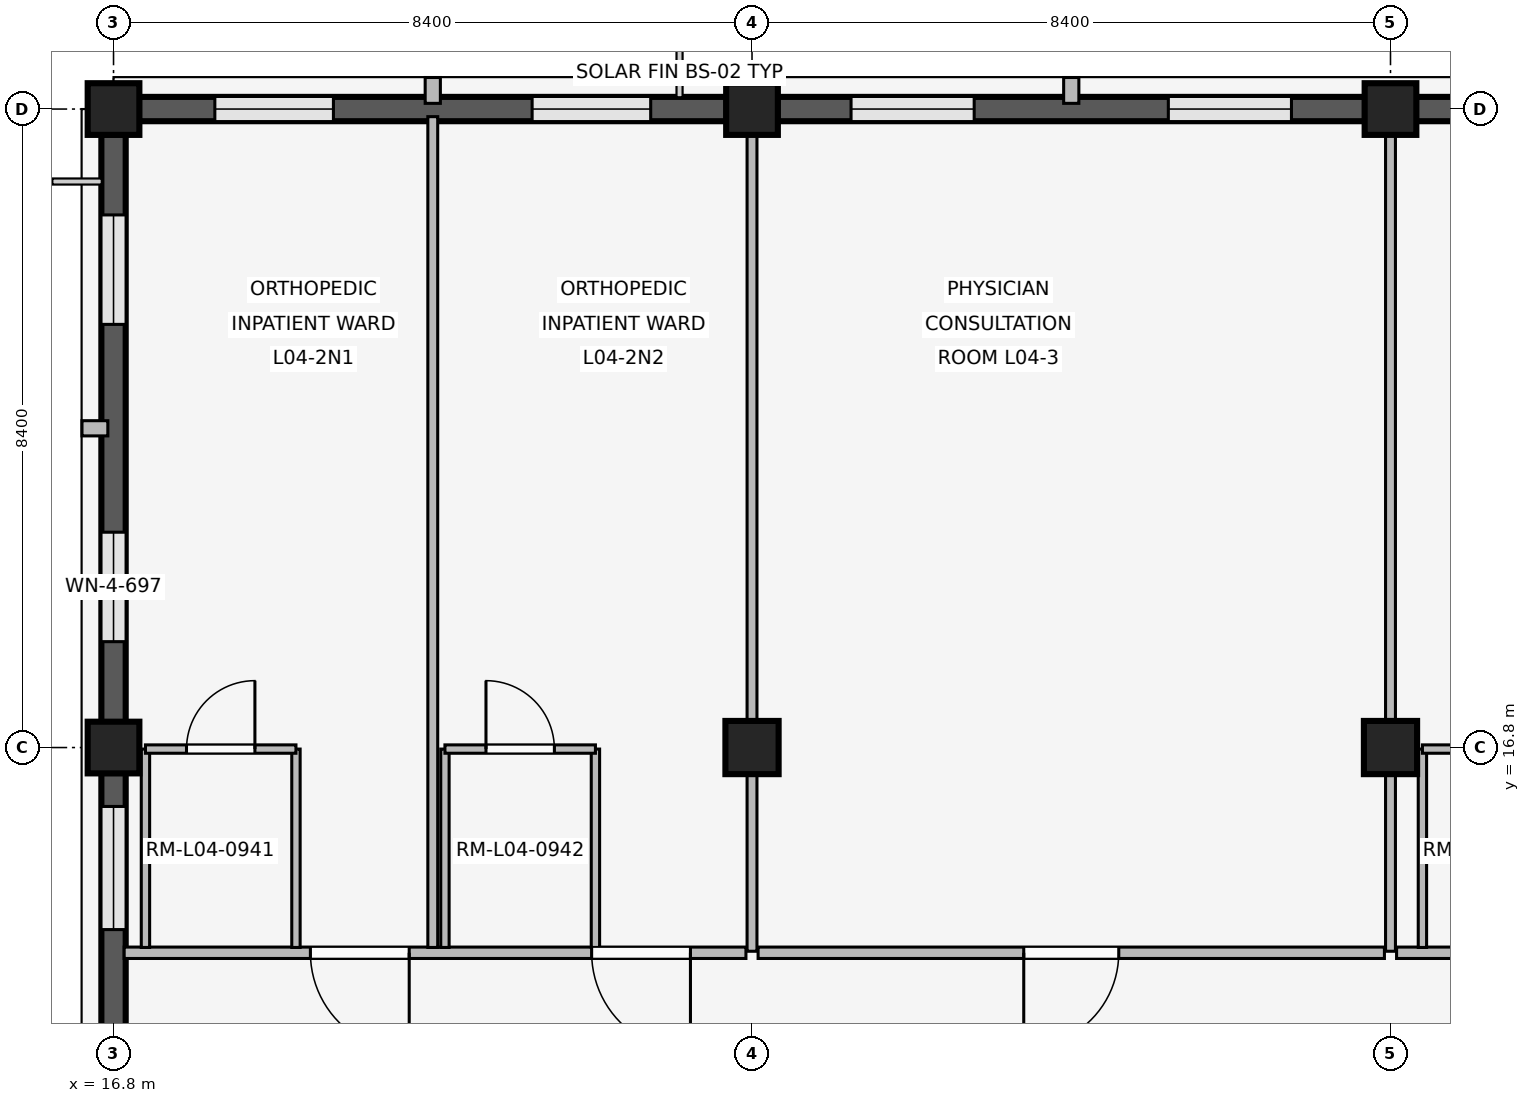
"""IFC4 building model, lengths in metres.
Left out: names, types, materials, properties, quantities, classifications, styles, units other than length and angle.
Written with IfcOpenShell. Run it as: python <this file> out.ifc"""

import sys

from ifc_helpers import new_model, si_unit, direction, frame, frame_2d, origin, origin_2d, place, context, subcontext, project, spatial, rectangle, extrude, element, fill, save


model = new_model("IFC4")
c1 = context("Model", 3, precision=1e-05, world=origin(), true_north=direction((0.0, 1.0)))
c2 = subcontext(c1, "Body", "Model", "MODEL_VIEW")
j1 = project(units=[si_unit("LENGTHUNIT", "METRE"), si_unit("PLANEANGLEUNIT", "RADIAN")], contexts=[c1])
p1 = place(None, origin())
s1 = spatial("IfcSite", under=j1, at=p1, CompositionType="ELEMENT")
p2 = place(p1, origin())
s2 = spatial("IfcBuilding", under=s1, at=p2, CompositionType="ELEMENT")
p3 = place(p2, frame((0.0, 0.0, 16.2)))
s3 = spatial("IfcBuildingStorey", under=s2, at=p3, CompositionType="ELEMENT", Elevation=16.2)
for number, where, z_axis, x_axis in (
    (1, (16.8, 16.8, 0.0), (0.0, 0.0, 1.0), (1.0, 0.0, 0.0)),
    (2, (16.8, 25.2, 0.0), (0.0, 0.0, 1.0), (1.0, 0.0, 0.0)),
):
    element("IfcColumn", number, at=place(p3, frame(where, z_axis=z_axis, x_axis=x_axis)), inside=s3, PredefinedType="COLUMN", context=c2, shape_type="SweptSolid", body=[
        extrude(rectangle(XDim=0.68, YDim=0.68, at=origin_2d()), origin(), (0.0, 0.0, 1.0), 4.2),
    ])
p4 = place(p3, frame((25.2, 16.8, 0.0), z_axis=(0.0, 0.0, 1.0), x_axis=(1.0, 0.0, 0.0)))
e3 = element("IfcColumn", 3, at=p4, inside=s3, PredefinedType="COLUMN", context=c2, shape_type="SweptSolid", body=[
    extrude(rectangle(XDim=0.7, YDim=0.7, at=origin_2d()), origin(), (0.0, 0.0, 1.0), 4.2),
])
p5 = place(p3, frame((25.2, 25.2, 0.0), z_axis=(0.0, 0.0, 1.0), x_axis=(1.0, 0.0, 0.0)))
e4 = element("IfcColumn", 4, at=p5, inside=s3, PredefinedType="COLUMN", context=c2, shape_type="SweptSolid", body=[
    extrude(rectangle(XDim=0.68, YDim=0.68, at=origin_2d()), origin(), (0.0, 0.0, 1.0), 4.2),
])
p6 = place(p3, frame((33.6, 16.8, 0.0), z_axis=(0.0, 0.0, 1.0), x_axis=(1.0, 0.0, 0.0)))
e5 = element("IfcColumn", 5, at=p6, inside=s3, PredefinedType="COLUMN", context=c2, shape_type="SweptSolid", body=[
    extrude(rectangle(XDim=0.7, YDim=0.7, at=origin_2d()), origin(), (0.0, 0.0, 1.0), 4.2),
])
p7 = place(p3, frame((33.6, 25.2, 0.0), z_axis=(0.0, 0.0, 1.0), x_axis=(1.0, 0.0, 0.0)))
e6 = element("IfcColumn", 6, at=p7, inside=s3, PredefinedType="COLUMN", context=c2, shape_type="SweptSolid", body=[
    extrude(rectangle(XDim=0.68, YDim=0.68, at=origin_2d()), origin(), (0.0, 0.0, 1.0), 4.2),
])
p8 = place(p3, frame((16.8, 8.735, 0.0), z_axis=(0.0, 0.0, 1.0), x_axis=(0.0, 1.0, 0.0)))
e7 = element("IfcWall", 7, at=p8, inside=s3, PredefinedType="SOLIDWALL", context=c2, shape_type="SweptSolid", body=[
    extrude(rectangle(XDim=7.73, YDim=0.32, at=frame_2d((3.865, 0.0))), origin(), (0.0, 0.0, 1.0), 3.32),
])
p9 = place(p8, frame((0.49, 0.0, 0.85)))
e8 = element("IfcOpeningElement", 8, at=p9, cuts=e7, PredefinedType="OPENING", context=c2, shape_type="SweptSolid", body=[
    extrude(rectangle(XDim=1.62, YDim=1.8, at=frame_2d((0.81, 0.9))), frame((0.0, 0.17, 0.0), z_axis=(0.0, -1.0, 0.0), x_axis=(1.0, 0.0, 0.0)), (0.0, 0.0, 1.0), 0.34),
])
p10 = place(p8, frame((5.67, 0.0, 0.85)))
e9 = element("IfcOpeningElement", 9, at=p10, cuts=e7, PredefinedType="OPENING", context=c2, shape_type="SweptSolid", body=[
    extrude(rectangle(XDim=1.62, YDim=1.8, at=frame_2d((0.81, 0.9))), frame((0.0, 0.17, 0.0), z_axis=(0.0, -1.0, 0.0), x_axis=(1.0, 0.0, 0.0)), (0.0, 0.0, 1.0), 0.34),
])
p11 = place(p3, frame((17.135, 25.2, 0.0), z_axis=(0.0, 0.0, 1.0), x_axis=(1.0, 0.0, 0.0)))
e10 = element("IfcWall", 10, at=p11, inside=s3, PredefinedType="SOLIDWALL", context=c2, shape_type="SweptSolid", body=[
    extrude(rectangle(XDim=7.73, YDim=0.32, at=frame_2d((3.865, 0.0))), origin(), (0.0, 0.0, 1.0), 3.32),
])
p12 = place(p11, frame((0.998, 0.0, 0.85)))
e11 = element("IfcOpeningElement", 11, at=p12, cuts=e10, PredefinedType="OPENING", context=c2, shape_type="SweptSolid", body=[
    extrude(rectangle(XDim=1.56, YDim=1.7, at=frame_2d((0.78, 0.85))), frame((0.0, 0.17, 0.0), z_axis=(0.0, -1.0, 0.0), x_axis=(1.0, 0.0, 0.0)), (0.0, 0.0, 1.0), 0.34),
])
p13 = place(p11, frame((5.172, 0.0, 0.85)))
e12 = element("IfcOpeningElement", 12, at=p13, cuts=e10, PredefinedType="OPENING", context=c2, shape_type="SweptSolid", body=[
    extrude(rectangle(XDim=1.56, YDim=1.7, at=frame_2d((0.78, 0.85))), frame((0.0, 0.17, 0.0), z_axis=(0.0, -1.0, 0.0), x_axis=(1.0, 0.0, 0.0)), (0.0, 0.0, 1.0), 0.34),
])
p14 = place(p3, frame((21.0, 25.275, 0.0), z_axis=(0.0, 0.0, 1.0), x_axis=(0.0, 1.0, 0.0)))
e13 = element("IfcWall", 13, at=p14, inside=s3, PredefinedType="ELEMENTEDWALL", context=c2, shape_type="SweptSolid", body=[
    extrude(rectangle(XDim=0.34, YDim=0.2, at=frame_2d((0.17, 0.0))), origin(), (0.0, 0.0, 1.0), 3.3),
])
p15 = place(p3, frame((16.8, 17.135, 0.0), z_axis=(0.0, 0.0, 1.0), x_axis=(0.0, 1.0, 0.0)))
e14 = element("IfcWall", 14, at=p15, inside=s3, PredefinedType="SOLIDWALL", context=c2, shape_type="SweptSolid", body=[
    extrude(rectangle(XDim=7.73, YDim=0.32, at=frame_2d((3.865, 0.0))), origin(), (0.0, 0.0, 1.0), 3.32),
])
p16 = place(p15, frame((1.058, 0.0, 0.85)))
e15 = element("IfcOpeningElement", 15, at=p16, cuts=e14, PredefinedType="OPENING", context=c2, shape_type="SweptSolid", body=[
    extrude(rectangle(XDim=1.44, YDim=1.62, at=frame_2d((0.72, 0.81))), frame((0.0, 0.17, 0.0), z_axis=(0.0, -1.0, 0.0), x_axis=(1.0, 0.0, 0.0)), (0.0, 0.0, 1.0), 0.34),
])
p17 = place(p15, frame((5.232, 0.0, 0.85)))
e16 = element("IfcOpeningElement", 16, at=p17, cuts=e14, PredefinedType="OPENING", context=c2, shape_type="SweptSolid", body=[
    extrude(rectangle(XDim=1.44, YDim=1.62, at=frame_2d((0.72, 0.81))), frame((0.0, 0.17, 0.0), z_axis=(0.0, -1.0, 0.0), x_axis=(1.0, 0.0, 0.0)), (0.0, 0.0, 1.0), 0.34),
])
p18 = place(p3, frame((16.725, 21.0, 0.0), z_axis=(0.0, 0.0, 1.0), x_axis=(-1.0, 0.0, 0.0)))
e17 = element("IfcWall", 17, at=p18, inside=s3, PredefinedType="ELEMENTEDWALL", context=c2, shape_type="SweptSolid", body=[
    extrude(rectangle(XDim=0.34, YDim=0.2, at=frame_2d((0.17, 0.0))), origin(), (0.0, 0.0, 1.0), 3.3),
])
p19 = place(p3, frame((25.535, 25.2, 0.0), z_axis=(0.0, 0.0, 1.0), x_axis=(1.0, 0.0, 0.0)))
e18 = element("IfcWall", 18, at=p19, inside=s3, PredefinedType="SOLIDWALL", context=c2, shape_type="SweptSolid", body=[
    extrude(rectangle(XDim=7.73, YDim=0.32, at=frame_2d((3.865, 0.0))), origin(), (0.0, 0.0, 1.0), 3.32),
])
p20 = place(p19, frame((0.968, 0.0, 0.85)))
e19 = element("IfcOpeningElement", 19, at=p20, cuts=e18, PredefinedType="OPENING", context=c2, shape_type="SweptSolid", body=[
    extrude(rectangle(XDim=1.62, YDim=1.8, at=frame_2d((0.81, 0.9))), frame((0.0, 0.17, 0.0), z_axis=(0.0, -1.0, 0.0), x_axis=(1.0, 0.0, 0.0)), (0.0, 0.0, 1.0), 0.34),
])
p21 = place(p19, frame((5.142, 0.0, 0.85)))
e20 = element("IfcOpeningElement", 20, at=p21, cuts=e18, PredefinedType="OPENING", context=c2, shape_type="SweptSolid", body=[
    extrude(rectangle(XDim=1.62, YDim=1.8, at=frame_2d((0.81, 0.9))), frame((0.0, 0.17, 0.0), z_axis=(0.0, -1.0, 0.0), x_axis=(1.0, 0.0, 0.0)), (0.0, 0.0, 1.0), 0.34),
])
p22 = place(p3, frame((29.4, 25.275, 0.0), z_axis=(0.0, 0.0, 1.0), x_axis=(0.0, 1.0, 0.0)))
e21 = element("IfcWall", 21, at=p22, inside=s3, PredefinedType="ELEMENTEDWALL", context=c2, shape_type="SweptSolid", body=[
    extrude(rectangle(XDim=0.34, YDim=0.2, at=frame_2d((0.17, 0.0))), origin(), (0.0, 0.0, 1.0), 3.3),
])
p23 = place(p3, frame((33.935, 25.2, 0.0), z_axis=(0.0, 0.0, 1.0), x_axis=(1.0, 0.0, 0.0)))
e22 = element("IfcWall", 22, at=p23, inside=s3, PredefinedType="SOLIDWALL", context=c2, shape_type="SweptSolid", body=[
    extrude(rectangle(XDim=7.73, YDim=0.32, at=frame_2d((3.865, 0.0))), origin(), (0.0, 0.0, 1.0), 3.32),
])
p24 = place(p23, frame((1.058, 0.0, 0.85)))
e23 = element("IfcOpeningElement", 23, at=p24, cuts=e22, PredefinedType="OPENING", context=c2, shape_type="SweptSolid", body=[
    extrude(rectangle(XDim=1.44, YDim=1.62, at=frame_2d((0.72, 0.81))), frame((0.0, 0.17, 0.0), z_axis=(0.0, -1.0, 0.0), x_axis=(1.0, 0.0, 0.0)), (0.0, 0.0, 1.0), 0.34),
])
p25 = place(p23, frame((5.232, 0.0, 0.85)))
e24 = element("IfcOpeningElement", 24, at=p25, cuts=e22, PredefinedType="OPENING", context=c2, shape_type="SweptSolid", body=[
    extrude(rectangle(XDim=1.44, YDim=1.62, at=frame_2d((0.72, 0.81))), frame((0.0, 0.17, 0.0), z_axis=(0.0, -1.0, 0.0), x_axis=(1.0, 0.0, 0.0)), (0.0, 0.0, 1.0), 0.34),
])
p26 = place(p3, frame((25.12, 14.1, 0.0), z_axis=(0.0, 0.0, 1.0), x_axis=(-1.0, 0.0, 0.0)))
e25 = element("IfcWall", 25, at=p26, inside=s3, PredefinedType="PARTITIONING", context=c2, shape_type="SweptSolid", body=[
    extrude(rectangle(XDim=8.18, YDim=0.15, at=frame_2d((4.09, 0.0))), origin(), (0.0, 0.0, 1.0), 3.3),
])
p27 = place(p26, frame((0.73, 0.0, 0.0)))
e26 = element("IfcOpeningElement", 26, at=p27, cuts=e25, PredefinedType="OPENING", context=c2, shape_type="SweptSolid", body=[
    extrude(rectangle(XDim=1.3, YDim=2.25, at=frame_2d((0.65, 1.125))), frame((0.0, 0.085, 0.0), z_axis=(0.0, -1.0, 0.0), x_axis=(1.0, 0.0, 0.0)), (0.0, 0.0, 1.0), 0.17),
])
p28 = place(p26, frame((4.43, 0.0, 0.0)))
e27 = element("IfcOpeningElement", 27, at=p28, cuts=e25, PredefinedType="OPENING", context=c2, shape_type="SweptSolid", body=[
    extrude(rectangle(XDim=1.3, YDim=2.25, at=frame_2d((0.65, 1.125))), frame((0.0, 0.085, 0.0), z_axis=(0.0, -1.0, 0.0), x_axis=(1.0, 0.0, 0.0)), (0.0, 0.0, 1.0), 0.17),
])
p29 = place(p3, frame((21.0, 14.17, 0.0), z_axis=(0.0, 0.0, 1.0), x_axis=(0.0, 1.0, 0.0)))
e28 = element("IfcWall", 28, at=p29, inside=s3, PredefinedType="PARTITIONING", context=c2, shape_type="SweptSolid", body=[
    extrude(rectangle(XDim=10.93, YDim=0.13, at=frame_2d((5.465, 0.0))), origin(), (0.0, 0.0, 1.0), 3.3),
])
for number, where, z_axis, x_axis in (
    (29, (17.22, 14.17, 0.0), (0.0, 0.0, 1.0), (0.0, 1.0, 0.0)),
    (30, (19.2, 14.17, 0.0), (0.0, 0.0, 1.0), (0.0, 1.0, 0.0)),
):
    element("IfcWall", number, at=place(p3, frame(where, z_axis=z_axis, x_axis=x_axis)), inside=s3, PredefinedType="PARTITIONING", context=c2, shape_type="SweptSolid", body=[
        extrude(rectangle(XDim=2.61, YDim=0.11, at=frame_2d((1.305, 0.0))), origin(), (0.0, 0.0, 1.0), 3.3),
    ])
p30 = place(p3, frame((17.22, 16.78, 0.0), z_axis=(0.0, 0.0, 1.0), x_axis=(1.0, 0.0, 0.0)))
e31 = element("IfcWall", 31, at=p30, inside=s3, PredefinedType="PARTITIONING", context=c2, shape_type="SweptSolid", body=[
    extrude(rectangle(XDim=1.98, YDim=0.11, at=frame_2d((0.99, 0.0))), origin(), (0.0, 0.0, 1.0), 3.3),
])
p31 = place(p30, frame((0.54, 0.0, 0.0)))
e32 = element("IfcOpeningElement", 32, at=p31, cuts=e31, PredefinedType="OPENING", context=c2, shape_type="SweptSolid", body=[
    extrude(rectangle(XDim=0.9, YDim=2.1, at=frame_2d((0.45, 1.05))), frame((0.0, 0.065, 0.0), z_axis=(0.0, -1.0, 0.0), x_axis=(1.0, 0.0, 0.0)), (0.0, 0.0, 1.0), 0.13),
])
for number, where, z_axis, x_axis in (
    (33, (21.16, 14.17, 0.0), (0.0, 0.0, 1.0), (0.0, 1.0, 0.0)),
    (34, (23.14, 14.17, 0.0), (0.0, 0.0, 1.0), (0.0, 1.0, 0.0)),
):
    element("IfcWall", number, at=place(p3, frame(where, z_axis=z_axis, x_axis=x_axis)), inside=s3, PredefinedType="PARTITIONING", context=c2, shape_type="SweptSolid", body=[
        extrude(rectangle(XDim=2.61, YDim=0.11, at=frame_2d((1.305, 0.0))), origin(), (0.0, 0.0, 1.0), 3.3),
    ])
p32 = place(p3, frame((21.16, 16.78, 0.0), z_axis=(0.0, 0.0, 1.0), x_axis=(1.0, 0.0, 0.0)))
e35 = element("IfcWall", 35, at=p32, inside=s3, PredefinedType="PARTITIONING", context=c2, shape_type="SweptSolid", body=[
    extrude(rectangle(XDim=1.98, YDim=0.11, at=frame_2d((0.99, 0.0))), origin(), (0.0, 0.0, 1.0), 3.3),
])
p33 = place(p32, frame((0.54, 0.0, 0.0)))
e36 = element("IfcOpeningElement", 36, at=p33, cuts=e35, PredefinedType="OPENING", context=c2, shape_type="SweptSolid", body=[
    extrude(rectangle(XDim=0.9, YDim=2.1, at=frame_2d((0.45, 1.05))), frame((0.0, 0.065, 0.0), z_axis=(0.0, -1.0, 0.0), x_axis=(1.0, 0.0, 0.0)), (0.0, 0.0, 1.0), 0.13),
])
p34 = place(p3, frame((25.2, 14.12, 0.0), z_axis=(0.0, 0.0, 1.0), x_axis=(0.0, 1.0, 0.0)))
e37 = element("IfcWall", 37, at=p34, inside=s3, PredefinedType="PARTITIONING", context=c2, shape_type="SweptSolid", body=[
    extrude(rectangle(XDim=10.94, YDim=0.13, at=frame_2d((5.47, 0.0))), origin(), (0.0, 0.0, 1.0), 3.3),
])
p35 = place(p3, frame((33.52, 14.1, 0.0), z_axis=(0.0, 0.0, 1.0), x_axis=(-1.0, 0.0, 0.0)))
e38 = element("IfcWall", 38, at=p35, inside=s3, PredefinedType="PARTITIONING", context=c2, shape_type="SweptSolid", body=[
    extrude(rectangle(XDim=8.24, YDim=0.15, at=frame_2d((4.12, 0.0))), origin(), (0.0, 0.0, 1.0), 3.3),
])
p36 = place(p35, frame((3.495, 0.0, 0.0)))
e39 = element("IfcOpeningElement", 39, at=p36, cuts=e38, PredefinedType="OPENING", context=c2, shape_type="SweptSolid", body=[
    extrude(rectangle(XDim=1.25, YDim=2.2, at=frame_2d((0.625, 1.1))), frame((0.0, 0.085, 0.0), z_axis=(0.0, -1.0, 0.0), x_axis=(1.0, 0.0, 0.0)), (0.0, 0.0, 1.0), 0.17),
])
p37 = place(p3, frame((33.6, 14.12, 0.0), z_axis=(0.0, 0.0, 1.0), x_axis=(0.0, 1.0, 0.0)))
e40 = element("IfcWall", 40, at=p37, inside=s3, PredefinedType="PARTITIONING", context=c2, shape_type="SweptSolid", body=[
    extrude(rectangle(XDim=10.94, YDim=0.13, at=frame_2d((5.47, 0.0))), origin(), (0.0, 0.0, 1.0), 3.3),
])
p38 = place(p3, frame((41.64, 14.1, 0.0), z_axis=(0.0, 0.0, 1.0), x_axis=(-1.0, 0.0, 0.0)))
e41 = element("IfcWall", 41, at=p38, inside=s3, PredefinedType="PARTITIONING", context=c2, shape_type="SweptSolid", body=[
    extrude(rectangle(XDim=7.96, YDim=0.15, at=frame_2d((3.98, 0.0))), origin(), (0.0, 0.0, 1.0), 3.3),
])
p39 = place(p38, frame((0.45, 0.0, 0.0)))
e42 = element("IfcOpeningElement", 42, at=p39, cuts=e41, PredefinedType="OPENING", context=c2, shape_type="SweptSolid", body=[
    extrude(rectangle(XDim=1.3, YDim=2.25, at=frame_2d((0.65, 1.125))), frame((0.0, 0.085, 0.0), z_axis=(0.0, -1.0, 0.0), x_axis=(1.0, 0.0, 0.0)), (0.0, 0.0, 1.0), 0.17),
])
p40 = place(p38, frame((4.15, 0.0, 0.0)))
e43 = element("IfcOpeningElement", 43, at=p40, cuts=e41, PredefinedType="OPENING", context=c2, shape_type="SweptSolid", body=[
    extrude(rectangle(XDim=1.3, YDim=2.25, at=frame_2d((0.65, 1.125))), frame((0.0, 0.085, 0.0), z_axis=(0.0, -1.0, 0.0), x_axis=(1.0, 0.0, 0.0)), (0.0, 0.0, 1.0), 0.17),
])
p41 = place(p3, frame((34.02, 14.17, 0.0), z_axis=(0.0, 0.0, 1.0), x_axis=(0.0, 1.0, 0.0)))
e44 = element("IfcWall", 44, at=p41, inside=s3, PredefinedType="PARTITIONING", context=c2, shape_type="SweptSolid", body=[
    extrude(rectangle(XDim=2.61, YDim=0.11, at=frame_2d((1.305, 0.0))), origin(), (0.0, 0.0, 1.0), 3.3),
])
p42 = place(p3, frame((34.02, 16.78, 0.0), z_axis=(0.0, 0.0, 1.0), x_axis=(1.0, 0.0, 0.0)))
e45 = element("IfcWall", 45, at=p42, inside=s3, PredefinedType="PARTITIONING", context=c2, shape_type="SweptSolid", body=[
    extrude(rectangle(XDim=1.98, YDim=0.11, at=frame_2d((0.99, 0.0))), origin(), (0.0, 0.0, 1.0), 3.3),
])
p43 = place(p42, frame((0.54, 0.0, 0.0)))
e46 = element("IfcOpeningElement", 46, at=p43, cuts=e45, PredefinedType="OPENING", context=c2, shape_type="SweptSolid", body=[
    extrude(rectangle(XDim=0.9, YDim=2.1, at=frame_2d((0.45, 1.05))), frame((0.0, 0.065, 0.0), z_axis=(0.0, -1.0, 0.0), x_axis=(1.0, 0.0, 0.0)), (0.0, 0.0, 1.0), 0.13),
])
p44 = place(p10, origin())
e47 = element("IfcWindow", 47, at=p44, inside=s3, PartitioningType="SINGLE_PANEL", PredefinedType="WINDOW", context=c2, shape_type="SweptSolid", body=[
    extrude(rectangle(XDim=1.62, YDim=1.8, at=frame_2d((0.81, 0.9))), frame((0.0, 0.03, 0.0), z_axis=(0.0, -1.0, 0.0), x_axis=(1.0, 0.0, 0.0)), (0.0, 0.0, 1.0), 0.06),
])
fill(e9, e47)
p45 = place(p12, origin())
e48 = element("IfcWindow", 48, at=p45, inside=s3, PartitioningType="SINGLE_PANEL", PredefinedType="WINDOW", context=c2, shape_type="SweptSolid", body=[
    extrude(rectangle(XDim=1.56, YDim=1.7, at=frame_2d((0.78, 0.85))), frame((0.0, 0.03, 0.0), z_axis=(0.0, -1.0, 0.0), x_axis=(1.0, 0.0, 0.0)), (0.0, 0.0, 1.0), 0.06),
])
fill(e11, e48)
p46 = place(p13, origin())
e49 = element("IfcWindow", 49, at=p46, inside=s3, PartitioningType="SINGLE_PANEL", PredefinedType="WINDOW", context=c2, shape_type="SweptSolid", body=[
    extrude(rectangle(XDim=1.56, YDim=1.7, at=frame_2d((0.78, 0.85))), frame((0.0, 0.03, 0.0), z_axis=(0.0, -1.0, 0.0), x_axis=(1.0, 0.0, 0.0)), (0.0, 0.0, 1.0), 0.06),
])
fill(e12, e49)
p47 = place(p16, origin())
e50 = element("IfcWindow", 50, at=p47, inside=s3, PartitioningType="SINGLE_PANEL", PredefinedType="WINDOW", context=c2, shape_type="SweptSolid", body=[
    extrude(rectangle(XDim=1.44, YDim=1.62, at=frame_2d((0.72, 0.81))), frame((0.0, 0.03, 0.0), z_axis=(0.0, -1.0, 0.0), x_axis=(1.0, 0.0, 0.0)), (0.0, 0.0, 1.0), 0.06),
])
fill(e15, e50)
p48 = place(p17, origin())
e51 = element("IfcWindow", 51, at=p48, inside=s3, PartitioningType="SINGLE_PANEL", PredefinedType="WINDOW", context=c2, shape_type="SweptSolid", body=[
    extrude(rectangle(XDim=1.44, YDim=1.62, at=frame_2d((0.72, 0.81))), frame((0.0, 0.03, 0.0), z_axis=(0.0, -1.0, 0.0), x_axis=(1.0, 0.0, 0.0)), (0.0, 0.0, 1.0), 0.06),
])
fill(e16, e51)
p49 = place(p20, origin())
e52 = element("IfcWindow", 52, at=p49, inside=s3, PartitioningType="SINGLE_PANEL", PredefinedType="WINDOW", context=c2, shape_type="SweptSolid", body=[
    extrude(rectangle(XDim=1.62, YDim=1.8, at=frame_2d((0.81, 0.9))), frame((0.0, 0.03, 0.0), z_axis=(0.0, -1.0, 0.0), x_axis=(1.0, 0.0, 0.0)), (0.0, 0.0, 1.0), 0.06),
])
fill(e19, e52)
p50 = place(p21, origin())
e53 = element("IfcWindow", 53, at=p50, inside=s3, PartitioningType="SINGLE_PANEL", PredefinedType="WINDOW", context=c2, shape_type="SweptSolid", body=[
    extrude(rectangle(XDim=1.62, YDim=1.8, at=frame_2d((0.81, 0.9))), frame((0.0, 0.03, 0.0), z_axis=(0.0, -1.0, 0.0), x_axis=(1.0, 0.0, 0.0)), (0.0, 0.0, 1.0), 0.06),
])
fill(e20, e53)
p51 = place(p27, origin())
e54 = element("IfcDoor", 54, at=p51, inside=s3, OperationType="SINGLE_SWING_LEFT", PredefinedType="DOOR", context=c2, shape_type="SweptSolid", body=[
    extrude(rectangle(XDim=1.3, YDim=2.25, at=frame_2d((0.65, 1.125))), frame((0.0, 0.025, 0.0), z_axis=(0.0, -1.0, 0.0), x_axis=(1.0, 0.0, 0.0)), (0.0, 0.0, 1.0), 0.05),
])
fill(e26, e54)
p52 = place(p28, origin())
e55 = element("IfcDoor", 55, at=p52, inside=s3, OperationType="SINGLE_SWING_LEFT", PredefinedType="DOOR", context=c2, shape_type="SweptSolid", body=[
    extrude(rectangle(XDim=1.3, YDim=2.25, at=frame_2d((0.65, 1.125))), frame((0.0, 0.025, 0.0), z_axis=(0.0, -1.0, 0.0), x_axis=(1.0, 0.0, 0.0)), (0.0, 0.0, 1.0), 0.05),
])
fill(e27, e55)
p53 = place(p31, origin())
e56 = element("IfcDoor", 56, at=p53, inside=s3, OperationType="SINGLE_SWING_RIGHT", PredefinedType="DOOR", context=c2, shape_type="SweptSolid", body=[
    extrude(rectangle(XDim=0.9, YDim=2.1, at=frame_2d((0.45, 1.05))), frame((0.0, 0.025, 0.0), z_axis=(0.0, -1.0, 0.0), x_axis=(1.0, 0.0, 0.0)), (0.0, 0.0, 1.0), 0.05),
])
fill(e32, e56)
p54 = place(p33, origin())
e57 = element("IfcDoor", 57, at=p54, inside=s3, OperationType="SINGLE_SWING_LEFT", PredefinedType="DOOR", context=c2, shape_type="SweptSolid", body=[
    extrude(rectangle(XDim=0.9, YDim=2.1, at=frame_2d((0.45, 1.05))), frame((0.0, 0.025, 0.0), z_axis=(0.0, -1.0, 0.0), x_axis=(1.0, 0.0, 0.0)), (0.0, 0.0, 1.0), 0.05),
])
fill(e36, e57)
p55 = place(p36, origin())
e58 = element("IfcDoor", 58, at=p55, inside=s3, OperationType="SINGLE_SWING_RIGHT", PredefinedType="DOOR", context=c2, shape_type="SweptSolid", body=[
    extrude(rectangle(XDim=1.25, YDim=2.2, at=frame_2d((0.625, 1.1))), frame((0.0, 0.025, 0.0), z_axis=(0.0, -1.0, 0.0), x_axis=(1.0, 0.0, 0.0)), (0.0, 0.0, 1.0), 0.05),
])
fill(e39, e58)
save(model, sys.argv[1])
